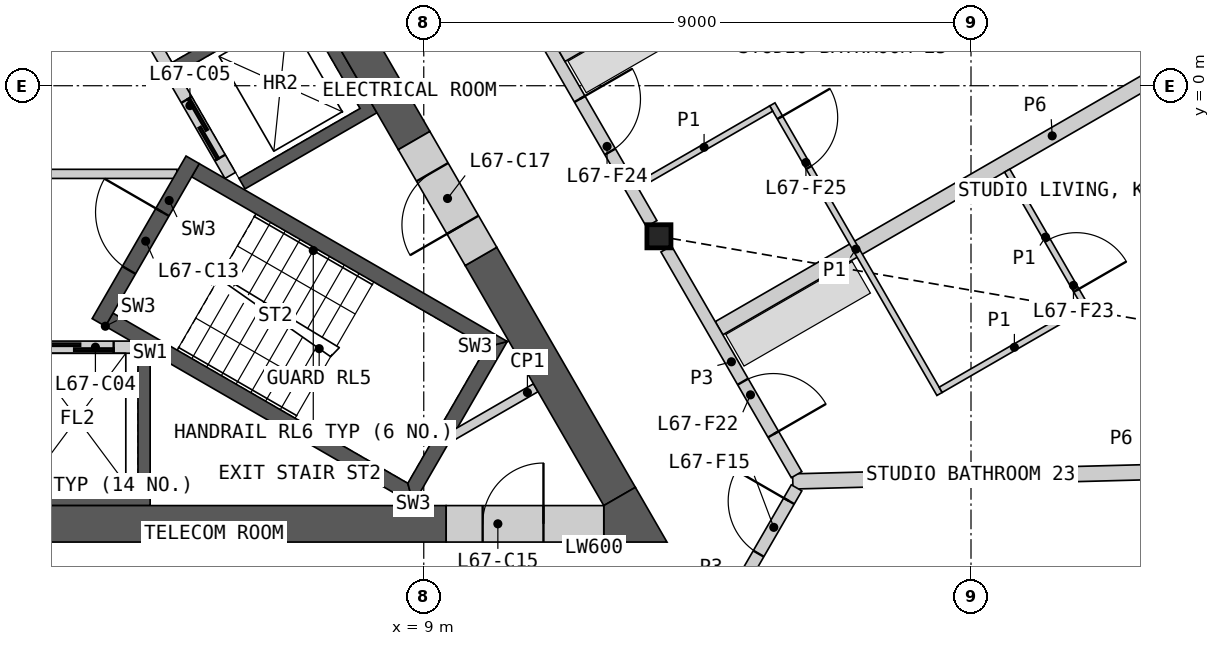
"""IFC4 building model, lengths in metres.
Left out: names, types, materials, properties, quantities, classifications, styles, units other than length and angle.
Written with IfcOpenShell. Run it as: python <this file> out.ifc"""

import sys

from ifc_helpers import new_model, si_unit, direction, frame, frame_2d, origin, origin_2d, place, context, subcontext, project, spatial, polyline, rectangle, i_section, outline, extrude, element, fill, save


model = new_model("IFC4")
c1 = context("Model", 3, precision=1e-05, world=origin(), true_north=direction((0.0, 1.0)))
c2 = subcontext(c1, "Body", "Model", "MODEL_VIEW")
j1 = project(units=[si_unit("LENGTHUNIT", "METRE"), si_unit("PLANEANGLEUNIT", "RADIAN")], contexts=[c1])
p1 = place(None, origin())
s1 = spatial("IfcSite", under=j1, at=p1, CompositionType="ELEMENT")
p2 = place(p1, origin())
s2 = spatial("IfcBuilding", under=s1, at=p2, CompositionType="ELEMENT")
p3 = place(p2, frame((0.0, 0.0, 308.6)))
s3 = spatial("IfcBuildingStorey", under=s2, at=p3, CompositionType="ELEMENT", Elevation=308.6)
p4 = place(p3, frame((12.868, -2.476, 0.0), z_axis=(0.0, 0.0, 1.0), x_axis=(1.0, 0.0, 0.0)))
e1 = element("IfcColumn", 1, at=p4, inside=s3, PredefinedType="COLUMN", context=c2, shape_type="SweptSolid", body=[
    extrude(i_section(OverallWidth=0.396, OverallDepth=0.381, WebThickness=0.019, FlangeThickness=0.03, at=origin_2d()), origin(), (0.0, 0.0, 1.0), 3.4),
])
p5 = place(p3, origin())
e2 = element("IfcWall", 2, at=p5, inside=s3, PredefinedType="SHEAR", context=c2, shape_type="SweptSolid", body=[
    extrude(outline(polyline([(4.5, -4.4), (4.5, -6.906), (-4.5, -6.906), (-4.5, -4.4), (-4.3, -4.4), (-4.3, -6.7), (-2.3, -6.7), (-2.3, -4.4), (-2.1, -4.4), (-2.1, -6.7), (-0.1, -6.7), (-0.1, -4.4), (0.1, -4.4), (0.1, -6.7), (2.1, -6.7), (2.1, -4.4), (2.3, -4.4), (2.3, -6.7), (4.3, -6.7), (4.3, -4.4), (4.5, -4.4)])), origin(), (0.0, 0.0, 1.0), 3.1),
])
p6 = place(p3, frame((-4.187, -4.3, 0.0), z_axis=(0.0, 0.0, 1.0), x_axis=(1.0, 0.0, 0.0)))
e3 = element("IfcWall", 3, at=p6, inside=s3, PredefinedType="SOLIDWALL", context=c2, shape_type="SweptSolid", body=[
    extrude(rectangle(XDim=8.373, YDim=0.2, at=frame_2d((4.187, 0.0))), origin(), (0.0, 0.0, 1.0), 3.1),
])
p7 = place(p6, frame((0.287, 0.0, 0.0)))
e4 = element("IfcOpeningElement", 4, at=p7, cuts=e3, PredefinedType="OPENING", context=c2, shape_type="SweptSolid", body=[
    extrude(rectangle(XDim=1.2, YDim=2.1, at=frame_2d((0.6, 1.05))), frame((0.0, 0.11, 0.0), z_axis=(0.0, -1.0, 0.0), x_axis=(1.0, 0.0, 0.0)), (0.0, 0.0, 1.0), 0.22),
])
p8 = place(p6, frame((2.387, 0.0, 0.0)))
e5 = element("IfcOpeningElement", 5, at=p8, cuts=e3, PredefinedType="OPENING", context=c2, shape_type="SweptSolid", body=[
    extrude(rectangle(XDim=1.4, YDim=2.1, at=frame_2d((0.7, 1.05))), frame((0.0, 0.11, 0.0), z_axis=(0.0, -1.0, 0.0), x_axis=(1.0, 0.0, 0.0)), (0.0, 0.0, 1.0), 0.22),
])
p9 = place(p6, frame((4.737, 0.0, 0.0)))
e6 = element("IfcOpeningElement", 6, at=p9, cuts=e3, PredefinedType="OPENING", context=c2, shape_type="SweptSolid", body=[
    extrude(rectangle(XDim=1.1, YDim=2.1, at=frame_2d((0.55, 1.05))), frame((0.0, 0.11, 0.0), z_axis=(0.0, -1.0, 0.0), x_axis=(1.0, 0.0, 0.0)), (0.0, 0.0, 1.0), 0.22),
])
p10 = place(p6, frame((6.887, 0.0, 0.0)))
e7 = element("IfcOpeningElement", 7, at=p10, cuts=e3, PredefinedType="OPENING", context=c2, shape_type="SweptSolid", body=[
    extrude(rectangle(XDim=1.2, YDim=2.1, at=frame_2d((0.6, 1.05))), frame((0.0, 0.11, 0.0), z_axis=(0.0, -1.0, 0.0), x_axis=(1.0, 0.0, 0.0)), (0.0, 0.0, 1.0), 0.22),
])
p11 = place(p3, origin())
e8 = element("IfcWall", 8, at=p11, inside=s3, PredefinedType="SHEAR", context=c2, shape_type="SweptSolid", body=[
    extrude(outline(polyline([(1.561, 6.097), (3.731, 7.35), (8.231, -0.444), (6.061, -1.697), (5.96, -1.524), (7.952, -0.374), (6.952, 1.358), (4.96, 0.208), (4.861, 0.381), (6.852, 1.531), (5.852, 3.263), (3.861, 2.113), (3.76, 2.287), (5.752, 3.437), (4.752, 5.169), (2.76, 4.019), (2.66, 4.192), (4.652, 5.342), (3.652, 7.074), (1.66, 5.924), (1.561, 6.097)])), origin(), (0.0, 0.0, 1.0), 3.1),
])
p12 = place(p3, frame((5.817, -1.476, 0.0), z_axis=(0.0, 0.0, 1.0), x_axis=(-0.500002616675, 0.866023893041, 0.0)))
e9 = element("IfcWall", 9, at=p12, inside=s3, PredefinedType="SOLIDWALL", context=c2, shape_type="SweptSolid", body=[
    extrude(rectangle(XDim=8.373, YDim=0.2, at=frame_2d((4.187, 0.0))), origin(), (0.0, 0.0, 1.0), 3.1),
])
p13 = place(p12, frame((0.337, 0.0, 0.0)))
e10 = element("IfcOpeningElement", 10, at=p13, cuts=e9, PredefinedType="OPENING", context=c2, shape_type="SweptSolid", body=[
    extrude(rectangle(XDim=1.1, YDim=2.1, at=frame_2d((0.55, 1.05))), frame((0.0, 0.11, 0.0), z_axis=(0.0, -1.0, 0.0), x_axis=(1.0, 0.0, 0.0)), (0.0, 0.0, 1.0), 0.22),
])
p14 = place(p12, frame((2.537, 0.0, 0.0)))
e11 = element("IfcOpeningElement", 11, at=p14, cuts=e9, PredefinedType="OPENING", context=c2, shape_type="SweptSolid", body=[
    extrude(rectangle(XDim=1.1, YDim=2.1, at=frame_2d((0.55, 1.05))), frame((0.0, 0.11, 0.0), z_axis=(0.0, -1.0, 0.0), x_axis=(1.0, 0.0, 0.0)), (0.0, 0.0, 1.0), 0.22),
])
p15 = place(p12, frame((4.737, 0.0, 0.0)))
e12 = element("IfcOpeningElement", 12, at=p15, cuts=e9, PredefinedType="OPENING", context=c2, shape_type="SweptSolid", body=[
    extrude(rectangle(XDim=1.1, YDim=2.1, at=frame_2d((0.55, 1.05))), frame((0.0, 0.11, 0.0), z_axis=(0.0, -1.0, 0.0), x_axis=(1.0, 0.0, 0.0)), (0.0, 0.0, 1.0), 0.22),
])
p16 = place(p12, frame((7.037, 0.0, 0.0)))
e13 = element("IfcOpeningElement", 13, at=p16, cuts=e9, PredefinedType="OPENING", context=c2, shape_type="SweptSolid", body=[
    extrude(rectangle(XDim=0.9, YDim=2.1, at=frame_2d((0.45, 1.05))), frame((0.0, 0.11, 0.0), z_axis=(0.0, -1.0, 0.0), x_axis=(1.0, 0.0, 0.0)), (0.0, 0.0, 1.0), 0.22),
])
p17 = place(p3, frame((-4.941, -1.45, 0.0), z_axis=(0.0, 0.0, 1.0), x_axis=(1.0, 0.0, 0.0)))
e14 = element("IfcWall", 14, at=p17, inside=s3, PredefinedType="PARTITIONING", context=c2, shape_type="SweptSolid", body=[
    extrude(rectangle(XDim=9.882, YDim=0.15, at=frame_2d((4.941, 0.0))), origin(), (0.0, 0.0, 1.0), 3.1),
])
p18 = place(p17, frame((4.391, 0.0, 0.0)))
e15 = element("IfcOpeningElement", 15, at=p18, cuts=e14, PredefinedType="OPENING", context=c2, shape_type="SweptSolid", body=[
    extrude(rectangle(XDim=1.1, YDim=2.1, at=frame_2d((0.55, 1.05))), frame((0.0, 0.085, 0.0), z_axis=(0.0, -1.0, 0.0), x_axis=(1.0, 0.0, 0.0)), (0.0, 0.0, 1.0), 0.17),
])
p19 = place(p3, origin())
e16 = element("IfcWall", 16, at=p19, inside=s3, PredefinedType="SHEAR", context=c2, shape_type="SweptSolid", body=[
    extrude(outline(polyline([(3.763, -3.956), (8.83, -6.881), (8.738, -6.539), (3.888, -3.739), (3.763, -3.956)])), origin(), (0.0, 0.0, 1.0), 3.1),
])
p20 = place(p3, origin())
e17 = element("IfcWall", 17, at=p20, inside=s3, PredefinedType="SHEAR", context=c2, shape_type="SweptSolid", body=[
    extrude(outline(polyline([(8.83, -6.881), (10.374, -4.206), (10.032, -4.298), (8.738, -6.539), (8.83, -6.881)])), origin(), (0.0, 0.0, 1.0), 3.1),
])
p21 = place(p3, origin())
e18 = element("IfcWall", 18, at=p21, inside=s3, PredefinedType="SHEAR", context=c2, shape_type="SweptSolid", body=[
    extrude(outline(polyline([(10.032, -4.298), (10.374, -4.206), (5.307, -1.281), (5.182, -1.498), (10.032, -4.298)])), origin(), (0.0, 0.0, 1.0), 3.1),
])
p22 = place(p3, frame((3.655, -3.893, 0.0), z_axis=(0.0, 0.0, 1.0), x_axis=(0.499982516597, 0.866035497597, 0.0)))
e19 = element("IfcWall", 19, at=p22, inside=s3, PredefinedType="SHEAR", context=c2, shape_type="SweptSolid", body=[
    extrude(rectangle(XDim=3.088, YDim=0.25, at=frame_2d((1.544, 0.0))), origin(), (0.0, 0.0, 1.0), 3.1),
])
p23 = place(p22, frame((0.994, 0.0, 0.0)))
e20 = element("IfcOpeningElement", 20, at=p23, cuts=e19, PredefinedType="OPENING", context=c2, shape_type="SweptSolid", body=[
    extrude(rectangle(XDim=1.1, YDim=2.1, at=frame_2d((0.55, 1.05))), frame((0.0, 0.135, 0.0), z_axis=(0.0, -1.0, 0.0), x_axis=(1.0, 0.0, 0.0)), (0.0, 0.0, 1.0), 0.27),
])
p24 = place(p3, frame((10.842, -4.967, 0.0), z_axis=(0.0, 0.0, 1.0), x_axis=(-0.866098216386, -0.499873863663, 0.0)))
e21 = element("IfcWall", 21, at=p24, inside=s3, PredefinedType="PARTITIONING", context=c2, shape_type="SweptSolid", body=[
    extrude(rectangle(XDim=1.582, YDim=0.15, at=frame_2d((0.791, 0.0))), origin(), (0.0, 0.0, 1.0), 3.1),
])
p25 = place(p3, frame((-4.892, -7.206, 0.0), z_axis=(0.0, 0.0, 1.0), x_axis=(1.0, 0.0, 0.0)))
e22 = element("IfcWall", 22, at=p25, inside=s3, PredefinedType="SHEAR", context=c2, shape_type="SweptSolid", body=[
    extrude(rectangle(XDim=14.261, YDim=0.6, at=frame_2d((7.13, 0.0))), origin(), (0.0, 0.0, 1.0), 3.1),
])
p26 = place(p3, frame((8.841, -0.902, 0.0), z_axis=(0.0, 0.0, 1.0), x_axis=(-0.499995618375, 0.866027933502, 0.0)))
e23 = element("IfcWall", 23, at=p26, inside=s3, PredefinedType="SHEAR", context=c2, shape_type="SweptSolid", body=[
    extrude(rectangle(XDim=14.571, YDim=0.6, at=frame_2d((7.285, 0.0))), origin(), (0.0, 0.0, 1.0), 3.1),
])
p27 = place(p3, frame((12.221, -6.756, 0.0), z_axis=(0.0, 0.0, 1.0), x_axis=(-0.500020646047, 0.866013483456, 0.0)))
e24 = element("IfcWall", 24, at=p27, inside=s3, PredefinedType="SHEAR", context=c2, shape_type="SweptSolid", body=[
    extrude(rectangle(XDim=4.559, YDim=0.6, at=frame_2d((2.28, 0.0))), origin(), (0.0, 0.0, 1.0), 3.1),
])
p28 = place(p3, origin())
e25 = element("IfcWall", 25, at=p28, inside=s3, PredefinedType="SHEAR", context=c2, shape_type="SweptSolid", body=[
    extrude(outline(polyline([(11.961, -7.506), (11.961, -6.906), (12.48, -6.606), (13.0, -7.506), (11.961, -7.506)])), origin(), (0.0, 0.0, 1.0), 3.1),
])
p29 = place(p3, frame((9.369, -7.206, 0.0), z_axis=(0.0, 0.0, 1.0), x_axis=(1.0, 0.0, 0.0)))
e26 = element("IfcWall", 26, at=p29, inside=s3, PredefinedType="SHEAR", context=c2, shape_type="SweptSolid", body=[
    extrude(rectangle(XDim=2.592, YDim=0.6, at=frame_2d((1.296, 0.0))), origin(), (0.0, 0.0, 1.0), 3.1),
])
p30 = place(p29, frame((0.6, 0.0, 0.0)))
e27 = element("IfcOpeningElement", 27, at=p30, cuts=e26, PredefinedType="OPENING", context=c2, shape_type="SweptSolid", body=[
    extrude(rectangle(XDim=1.0, YDim=2.1, at=frame_2d((0.5, 1.05))), frame((0.0, 0.31, 0.0), z_axis=(0.0, -1.0, 0.0), x_axis=(1.0, 0.0, 0.0)), (0.0, 0.0, 1.0), 0.62),
])
p31 = place(p3, frame((9.941, -2.807, 0.0), z_axis=(0.0, 0.0, 1.0), x_axis=(-0.499994660107, 0.866028486751, 0.0)))
e28 = element("IfcWall", 28, at=p31, inside=s3, PredefinedType="SHEAR", context=c2, shape_type="SweptSolid", body=[
    extrude(rectangle(XDim=2.2, YDim=0.6, at=frame_2d((1.1, 0.0))), origin(), (0.0, 0.0, 1.0), 3.1),
])
p32 = place(p31, frame((0.6, 0.0, 0.0)))
e29 = element("IfcOpeningElement", 29, at=p32, cuts=e28, PredefinedType="OPENING", context=c2, shape_type="SweptSolid", body=[
    extrude(rectangle(XDim=1.0, YDim=2.1, at=frame_2d((0.5, 1.05))), frame((0.0, 0.31, 0.0), z_axis=(0.0, -1.0, 0.0), x_axis=(1.0, 0.0, 0.0)), (0.0, 0.0, 1.0), 0.62),
])
p33 = place(p3, frame((15.069, -6.509, 0.0), z_axis=(0.0, 0.0, 1.0), x_axis=(0.999657828615, 0.026157708023, 0.0)))
e30 = element("IfcWall", 30, at=p33, inside=s3, PredefinedType="PARTITIONING", context=c2, shape_type="SweptSolid", body=[
    extrude(rectangle(XDim=15.773, YDim=0.25, at=frame_2d((7.887, 0.0))), origin(), (0.0, 0.0, 1.0), 2.33),
])
p34 = place(p3, frame((13.856, -3.988, 0.0), z_axis=(0.0, 0.0, 1.0), x_axis=(0.866021406514, 0.500006923412, 0.0)))
e31 = element("IfcWall", 31, at=p34, inside=s3, PredefinedType="PARTITIONING", context=c2, shape_type="SweptSolid", body=[
    extrude(rectangle(XDim=12.654, YDim=0.25, at=frame_2d((6.327, 0.0))), origin(), (0.0, 0.0, 1.0), 2.33),
])
p35 = place(p3, frame((8.698, 4.745, 0.0), z_axis=(0.0, 0.0, 1.0), x_axis=(0.499984266882, -0.866034487114, 0.0)))
e32 = element("IfcWall", 32, at=p35, inside=s3, PredefinedType="PARTITIONING", context=c2, shape_type="SweptSolid", body=[
    extrude(rectangle(XDim=8.099, YDim=0.2, at=frame_2d((4.049, 0.0))), origin(), (0.0, 0.0, 1.0), 3.1),
])
p36 = place(p35, frame((5.732, 0.0, 0.0)))
e33 = element("IfcOpeningElement", 33, at=p36, cuts=e32, PredefinedType="OPENING", context=c2, shape_type="SweptSolid", body=[
    extrude(rectangle(XDim=1.0, YDim=2.1, at=frame_2d((0.5, 1.05))), frame((0.0, 0.11, 0.0), z_axis=(0.0, -1.0, 0.0), x_axis=(1.0, 0.0, 0.0)), (0.0, 0.0, 1.0), 0.22),
])
p37 = place(p3, frame((11.26, 0.507, 0.0), z_axis=(0.0, 0.0, 1.0), x_axis=(0.86602842894, 0.499994760241, 0.0)))
e34 = element("IfcWall", 34, at=p37, inside=s3, PredefinedType="PARTITIONING", context=c2, shape_type="SweptSolid", body=[
    extrude(rectangle(XDim=7.968, YDim=0.25, at=frame_2d((3.984, 0.0))), origin(), (0.0, 0.0, 1.0), 2.33),
])
p38 = place(p3, frame((12.988, -2.684, 0.0), z_axis=(0.0, 0.0, 1.0), x_axis=(0.500003406062, -0.866023437285, 0.0)))
e35 = element("IfcWall", 35, at=p38, inside=s3, PredefinedType="PARTITIONING", context=c2, shape_type="SweptSolid", body=[
    extrude(rectangle(XDim=4.288, YDim=0.2, at=frame_2d((2.144, 0.0))), origin(), (0.0, 0.0, 1.0), 3.1),
])
p39 = place(p38, frame((2.521, 0.0, 0.0)))
e36 = element("IfcOpeningElement", 36, at=p39, cuts=e35, PredefinedType="OPENING", context=c2, shape_type="SweptSolid", body=[
    extrude(rectangle(XDim=1.0, YDim=2.1, at=frame_2d((0.5, 1.05))), frame((0.0, 0.11, 0.0), z_axis=(0.0, -1.0, 0.0), x_axis=(1.0, 0.0, 0.0)), (0.0, 0.0, 1.0), 0.22),
])
p40 = place(p3, frame((13.293, -9.797, 0.0), z_axis=(0.0, 0.0, 1.0), x_axis=(0.499967746641, 0.866044024469, 0.0)))
e37 = element("IfcWall", 37, at=p40, inside=s3, PredefinedType="PARTITIONING", context=c2, shape_type="SweptSolid", body=[
    extrude(rectangle(XDim=3.676, YDim=0.2, at=frame_2d((1.838, 0.0))), origin(), (0.0, 0.0, 1.0), 3.1),
])
p41 = place(p40, frame((2.426, 0.0, 0.0)))
e38 = element("IfcOpeningElement", 38, at=p41, cuts=e37, PredefinedType="OPENING", context=c2, shape_type="SweptSolid", body=[
    extrude(rectangle(XDim=1.0, YDim=2.1, at=frame_2d((0.5, 1.05))), frame((0.0, 0.11, 0.0), z_axis=(0.0, -1.0, 0.0), x_axis=(1.0, 0.0, 0.0)), (0.0, 0.0, 1.0), 0.22),
])
p42 = place(p3, frame((14.733, -0.307, 0.0), z_axis=(0.0, 0.0, 1.0), x_axis=(0.499996545922, -0.866027397988, 0.0)))
e39 = element("IfcWall", 39, at=p42, inside=s3, PredefinedType="PARTITIONING", context=c2, shape_type="SweptSolid", body=[
    extrude(rectangle(XDim=5.5, YDim=0.1, at=frame_2d((2.75, 0.0))), origin(), (0.0, 0.0, 1.0), 2.33),
])
p43 = place(p42, frame((0.25, 0.0, 0.0)))
e40 = element("IfcOpeningElement", 40, at=p43, cuts=e39, PredefinedType="OPENING", context=c2, shape_type="SweptSolid", body=[
    extrude(rectangle(XDim=0.95, YDim=2.1, at=frame_2d((0.475, 1.05))), frame((0.0, 0.06, 0.0), z_axis=(0.0, -1.0, 0.0), x_axis=(1.0, 0.0, 0.0)), (0.0, 0.0, 1.0), 0.12),
])
p44 = place(p3, frame((17.501, -5.001, 0.0), z_axis=(0.0, 0.0, 1.0), x_axis=(0.866034573852, 0.49998411664, 0.0)))
e41 = element("IfcWall", 41, at=p44, inside=s3, PredefinedType="PARTITIONING", context=c2, shape_type="SweptSolid", body=[
    extrude(rectangle(XDim=2.8, YDim=0.1, at=frame_2d((1.4, 0.0))), origin(), (0.0, 0.0, 1.0), 2.33),
])
p45 = place(p3, frame((18.595, -1.396, 0.0), z_axis=(0.0, 0.0, 1.0), x_axis=(0.499976333282, -0.866039067339, 0.0)))
e42 = element("IfcWall", 42, at=p45, inside=s3, PredefinedType="PARTITIONING", context=c2, shape_type="SweptSolid", body=[
    extrude(rectangle(XDim=2.525, YDim=0.1, at=frame_2d((1.262, 0.0))), origin(), (0.0, 0.0, 1.0), 2.33),
])
p46 = place(p45, frame((1.325, 0.0, 0.0)))
e43 = element("IfcOpeningElement", 43, at=p46, cuts=e42, PredefinedType="OPENING", context=c2, shape_type="SweptSolid", body=[
    extrude(rectangle(XDim=0.95, YDim=2.1, at=frame_2d((0.475, 1.05))), frame((0.0, 0.06, 0.0), z_axis=(0.0, -1.0, 0.0), x_axis=(1.0, 0.0, 0.0)), (0.0, 0.0, 1.0), 0.12),
])
p47 = place(p3, frame((12.506, -1.65, 0.0), z_axis=(0.0, 0.0, 1.0), x_axis=(0.866030925526, 0.499990435942, 0.0)))
e44 = element("IfcWall", 44, at=p47, inside=s3, PredefinedType="PARTITIONING", context=c2, shape_type="SweptSolid", body=[
    extrude(rectangle(XDim=2.55, YDim=0.1, at=frame_2d((1.275, 0.0))), origin(), (0.0, 0.0, 1.0), 2.33),
])
p48 = place(p10, origin())
e45 = element("IfcDoor", 45, at=p48, inside=s3, OperationType="SLIDING_TO_LEFT", PredefinedType="DOOR", context=c2, shape_type="SweptSolid", body=[
    extrude(rectangle(XDim=1.2, YDim=2.1, at=frame_2d((0.6, 1.05))), frame((0.0, 0.025, 0.0), z_axis=(0.0, -1.0, 0.0), x_axis=(1.0, 0.0, 0.0)), (0.0, 0.0, 1.0), 0.05),
])
fill(e7, e45)
p49 = place(p13, origin())
e46 = element("IfcDoor", 46, at=p49, inside=s3, OperationType="SLIDING_TO_LEFT", PredefinedType="DOOR", context=c2, shape_type="SweptSolid", body=[
    extrude(rectangle(XDim=1.1, YDim=2.1, at=frame_2d((0.55, 1.05))), frame((0.0, 0.025, 0.0), z_axis=(0.0, -1.0, 0.0), x_axis=(1.0, 0.0, 0.0)), (0.0, 0.0, 1.0), 0.05),
])
fill(e10, e46)
p50 = place(p23, origin())
e47 = element("IfcDoor", 47, at=p50, inside=s3, OperationType="SINGLE_SWING_RIGHT", PredefinedType="DOOR", context=c2, shape_type="SweptSolid", body=[
    extrude(rectangle(XDim=1.1, YDim=2.1, at=frame_2d((0.55, 1.05))), frame((0.0, 0.025, 0.0), z_axis=(0.0, -1.0, 0.0), x_axis=(1.0, 0.0, 0.0)), (0.0, 0.0, 1.0), 0.05),
])
fill(e20, e47)
p51 = place(p30, origin())
e48 = element("IfcDoor", 48, at=p51, inside=s3, OperationType="SINGLE_SWING_RIGHT", PredefinedType="DOOR", context=c2, shape_type="SweptSolid", body=[
    extrude(rectangle(XDim=1.0, YDim=2.1, at=frame_2d((0.5, 1.05))), frame((0.0, 0.055, 0.0), z_axis=(0.0, -1.0, 0.0), x_axis=(1.0, 0.0, 0.0)), (0.0, 0.0, 1.0), 0.05),
])
fill(e27, e48)
p52 = place(p32, origin())
e49 = element("IfcDoor", 49, at=p52, inside=s3, OperationType="SINGLE_SWING_LEFT", PredefinedType="DOOR", context=c2, shape_type="SweptSolid", body=[
    extrude(rectangle(XDim=1.0, YDim=2.1, at=frame_2d((0.5, 1.05))), frame((0.0, 0.055, 0.0), z_axis=(0.0, -1.0, 0.0), x_axis=(1.0, 0.0, 0.0)), (0.0, 0.0, 1.0), 0.05),
])
fill(e29, e49)
p53 = place(p41, origin())
e50 = element("IfcDoor", 50, at=p53, inside=s3, OperationType="SINGLE_SWING_RIGHT", PredefinedType="DOOR", context=c2, shape_type="SweptSolid", body=[
    extrude(rectangle(XDim=1.0, YDim=2.1, at=frame_2d((0.5, 1.05))), frame((0.0, 0.025, 0.0), z_axis=(0.0, -1.0, 0.0), x_axis=(1.0, 0.0, 0.0)), (0.0, 0.0, 1.0), 0.05),
])
fill(e38, e50)
p54 = place(p39, origin())
e51 = element("IfcDoor", 51, at=p54, inside=s3, OperationType="SINGLE_SWING_RIGHT", PredefinedType="DOOR", context=c2, shape_type="SweptSolid", body=[
    extrude(rectangle(XDim=1.0, YDim=2.1, at=frame_2d((0.5, 1.05))), frame((0.0, 0.025, 0.0), z_axis=(0.0, -1.0, 0.0), x_axis=(1.0, 0.0, 0.0)), (0.0, 0.0, 1.0), 0.05),
])
fill(e36, e51)
p55 = place(p46, origin())
e52 = element("IfcDoor", 52, at=p55, inside=s3, OperationType="SINGLE_SWING_RIGHT", PredefinedType="DOOR", context=c2, shape_type="SweptSolid", body=[
    extrude(rectangle(XDim=0.95, YDim=2.1, at=frame_2d((0.475, 1.05))), frame((0.0, 0.025, 0.0), z_axis=(0.0, -1.0, 0.0), x_axis=(1.0, 0.0, 0.0)), (0.0, 0.0, 1.0), 0.05),
])
fill(e43, e52)
p56 = place(p36, origin())
e53 = element("IfcDoor", 53, at=p56, inside=s3, OperationType="SINGLE_SWING_LEFT", PredefinedType="DOOR", context=c2, shape_type="SweptSolid", body=[
    extrude(rectangle(XDim=1.0, YDim=2.1, at=frame_2d((0.5, 1.05))), frame((0.0, 0.025, 0.0), z_axis=(0.0, -1.0, 0.0), x_axis=(1.0, 0.0, 0.0)), (0.0, 0.0, 1.0), 0.05),
])
fill(e33, e53)
p57 = place(p43, origin())
e54 = element("IfcDoor", 54, at=p57, inside=s3, OperationType="SINGLE_SWING_LEFT", PredefinedType="DOOR", context=c2, shape_type="SweptSolid", body=[
    extrude(rectangle(XDim=0.95, YDim=2.1, at=frame_2d((0.475, 1.05))), frame((0.0, 0.025, 0.0), z_axis=(0.0, -1.0, 0.0), x_axis=(1.0, 0.0, 0.0)), (0.0, 0.0, 1.0), 0.05),
])
fill(e40, e54)
save(model, sys.argv[1])
